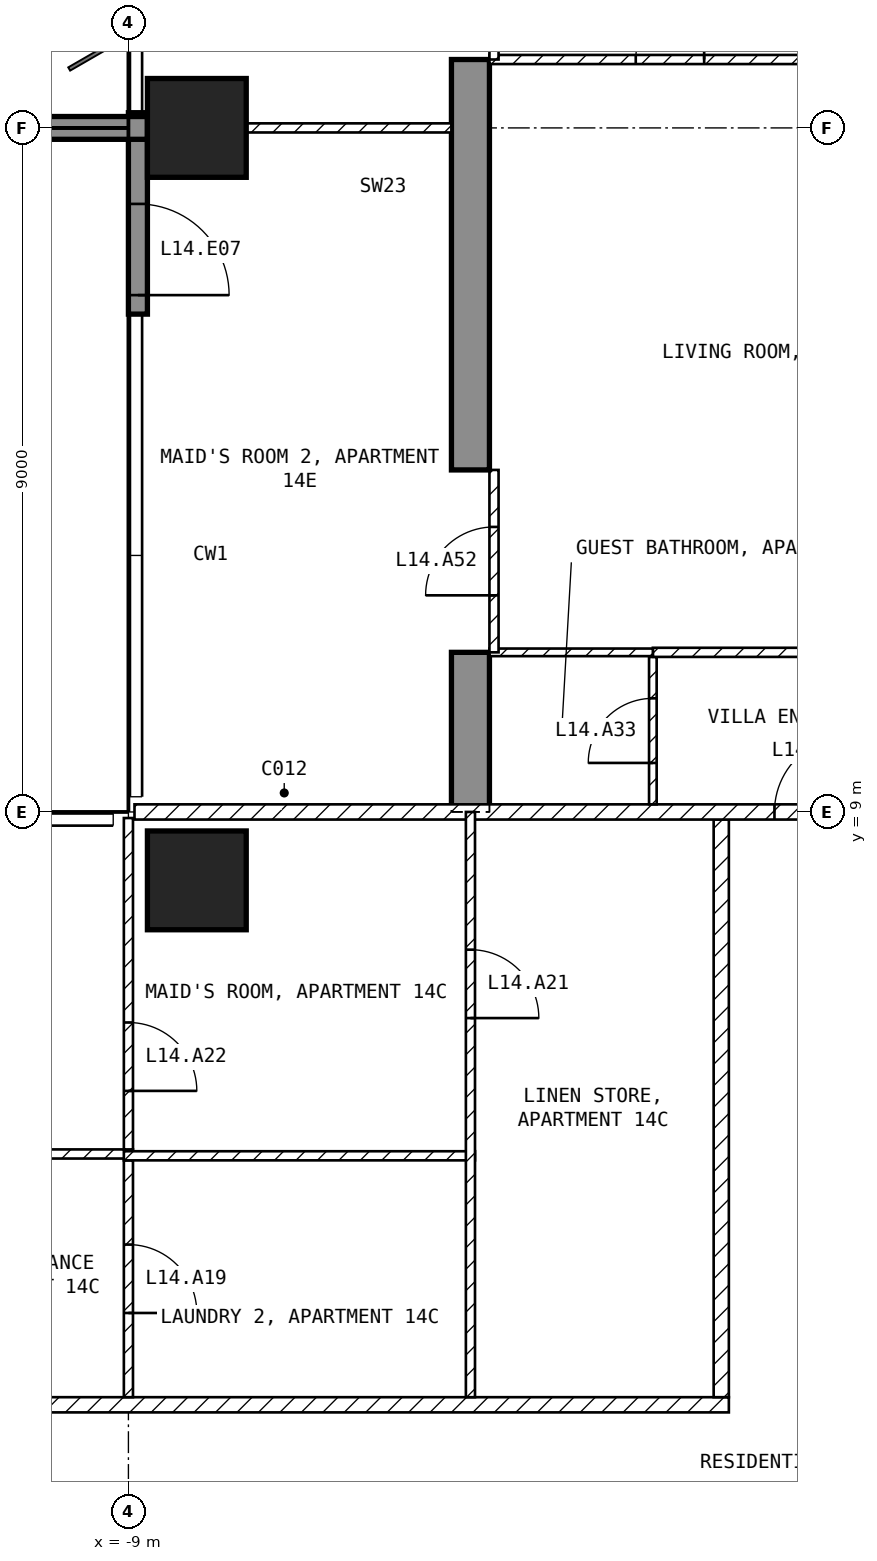
"""IFC4 building model, lengths in metres.
Left out: names, types, materials, properties, quantities, classifications, styles, units other than length and angle.
Written with IfcOpenShell. Run it as: python <this file> out.ifc"""

import sys

from ifc_helpers import new_model, si_unit, direction, frame, frame_2d, origin, origin_2d, place, context, subcontext, project, spatial, polyline, rectangle, outline, extrude, element, fill, save


model = new_model("IFC4")
c1 = context("Model", 3, precision=1e-05, world=origin(), true_north=direction((0.0, 1.0)))
c2 = subcontext(c1, "Body", "Model", "MODEL_VIEW")
j1 = project(units=[si_unit("LENGTHUNIT", "METRE"), si_unit("PLANEANGLEUNIT", "RADIAN")], contexts=[c1])
p1 = place(None, origin())
s1 = spatial("IfcSite", under=j1, at=p1, CompositionType="ELEMENT")
p2 = place(p1, origin())
s2 = spatial("IfcBuilding", under=s1, at=p2, CompositionType="ELEMENT")
p3 = place(p2, frame((0.0, 0.0, 68.0)))
s3 = spatial("IfcBuildingStorey", under=s2, at=p3, CompositionType="ELEMENT", Elevation=68.0)
for number, where, z_axis, x_axis in (
    (1, (-8.1, 8.1, -0.25), (0.0, 0.0, 1.0), (1.0, 0.0, 0.0)),
    (2, (-8.1, 18.0, -0.25), (0.0, 0.0, 1.0), (1.0, 0.0, 0.0)),
):
    element("IfcColumn", number, at=place(p3, frame(where, z_axis=z_axis, x_axis=x_axis)), inside=s3, PredefinedType="COLUMN", context=c2, shape_type="SweptSolid", body=[
        extrude(rectangle(XDim=1.3, YDim=1.3, at=origin_2d()), origin(), (0.0, 0.0, 1.0), 3.5),
    ])
p4 = place(p3, frame((-4.75, 9.0, -0.25), z_axis=(1.0, 0.0, 0.0), x_axis=(0.0, 1.0, 0.0)))
e3 = element("IfcWall", 3, at=p4, inside=s3, PredefinedType="SHEAR", context=c2, shape_type="SweptSolid", body=[
    extrude(outline(polyline([(0.0, 0.0), (2.1, 0.0), (2.1, 2.65), (4.5, 2.65), (4.5, 0.0), (9.9, 0.0), (9.9, 2.65), (12.3, 2.65), (12.3, 0.0), (16.45, 0.0), (16.45, 3.5), (0.0, 3.5), (0.0, 0.0)])), origin(), (0.0, 0.0, 1.0), 0.5),
])
p5 = place(p3, frame((-8.875, 18.2, 0.0), z_axis=(0.0, 0.0, 1.0), x_axis=(0.0, -1.0, 0.0)))
e4 = element("IfcWall", 4, at=p5, inside=s3, PredefinedType="SOLIDWALL", context=c2, shape_type="SweptSolid", body=[
    extrude(rectangle(XDim=2.65, YDim=0.25, at=frame_2d((1.325, 0.0))), origin(), (0.0, 0.0, 1.0), 3.25),
])
p6 = place(p5, frame((1.2, 0.0, 0.0)))
e5 = element("IfcOpeningElement", 5, at=p6, cuts=e4, PredefinedType="OPENING", context=c2, shape_type="SweptSolid", body=[
    extrude(rectangle(XDim=1.2, YDim=2.4, at=frame_2d((0.6, 1.2))), frame((0.0, 0.135, 0.0), z_axis=(0.0, -1.0, 0.0), x_axis=(1.0, 0.0, 0.0)), (0.0, 0.0, 1.0), 0.27),
])
p7 = place(p3, frame((-8.75, 18.0, 0.0), z_axis=(0.0, 0.0, 1.0), x_axis=(-1.0, 0.0, 0.0)))
e6 = element("IfcWall", 6, at=p7, inside=s3, PredefinedType="SOLIDWALL", context=c2, shape_type="SweptSolid", body=[
    extrude(rectangle(XDim=2.95, YDim=0.3, at=frame_2d((1.475, 0.0))), origin(), (0.0, 0.0, 1.0), 3.25),
])
p8 = place(p3, frame((-21.6, 1.2, 0.0), z_axis=(0.0, 0.0, 1.0), x_axis=(1.0, 0.0, 0.0)))
e7 = element("IfcWall", 7, at=p8, inside=s3, PredefinedType="PARTITIONING", context=c2, shape_type="SweptSolid", body=[
    extrude(rectangle(XDim=20.5, YDim=0.2, at=frame_2d((10.25, 0.0))), origin(), (0.0, 0.0, 1.0), 3.25),
])
p9 = place(p8, frame((10.3, 0.0, 0.0)))
e8 = element("IfcOpeningElement", 8, at=p9, cuts=e7, PredefinedType="OPENING", context=c2, shape_type="SweptSolid", body=[
    extrude(rectangle(XDim=1.0, YDim=2.1, at=frame_2d((0.5, 1.05))), frame((0.0, 0.11, 0.0), z_axis=(0.0, -1.0, 0.0), x_axis=(1.0, 0.0, 0.0)), (0.0, 0.0, 1.0), 0.22),
])
p10 = place(p3, frame((-1.2, 1.3, 0.0), z_axis=(0.0, 0.0, 1.0), x_axis=(0.0, 1.0, 0.0)))
e9 = element("IfcWall", 9, at=p10, inside=s3, PredefinedType="PARTITIONING", context=c2, shape_type="SweptSolid", body=[
    extrude(rectangle(XDim=7.6, YDim=0.2, at=frame_2d((3.8, 0.0))), origin(), (0.0, 0.0, 1.0), 3.25),
])
p11 = place(p3, frame((-8.92, 9.0, 0.0), z_axis=(0.0, 0.0, 1.0), x_axis=(1.0, 0.0, 0.0)))
e10 = element("IfcWall", 10, at=p11, inside=s3, PredefinedType="PARTITIONING", context=c2, shape_type="SweptSolid", body=[
    extrude(rectangle(XDim=17.84, YDim=0.2, at=frame_2d((8.92, 0.0))), origin(), (0.0, 0.0, 1.0), 3.25),
])
p12 = place(p11, frame((8.42, 0.0, 0.0)))
e11 = element("IfcOpeningElement", 11, at=p12, cuts=e10, PredefinedType="OPENING", context=c2, shape_type="SweptSolid", body=[
    extrude(rectangle(XDim=1.0, YDim=2.1, at=frame_2d((0.5, 1.05))), frame((0.0, 0.11, 0.0), z_axis=(0.0, -1.0, 0.0), x_axis=(1.0, 0.0, 0.0)), (0.0, 0.0, 1.0), 0.22),
])
p13 = place(p3, frame((-17.4, 4.5, 0.0), z_axis=(0.0, 0.0, 1.0), x_axis=(1.0, 0.0, 0.0)))
e12 = element("IfcWall", 12, at=p13, inside=s3, PredefinedType="PARTITIONING", context=c2, shape_type="SweptSolid", body=[
    extrude(rectangle(XDim=8.46, YDim=0.12, at=frame_2d((4.23, 0.0))), origin(), (0.0, 0.0, 1.0), 3.25),
])
p14 = place(p13, frame((0.45, 0.0, 0.0)))
e13 = element("IfcOpeningElement", 13, at=p14, cuts=e12, PredefinedType="OPENING", context=c2, shape_type="SweptSolid", body=[
    extrude(rectangle(XDim=0.9, YDim=2.1, at=frame_2d((0.45, 1.05))), frame((0.0, 0.07, 0.0), z_axis=(0.0, -1.0, 0.0), x_axis=(1.0, 0.0, 0.0)), (0.0, 0.0, 1.0), 0.14),
])
p15 = place(p13, frame((6.15, 0.0, 0.0)))
e14 = element("IfcOpeningElement", 14, at=p15, cuts=e12, PredefinedType="OPENING", context=c2, shape_type="SweptSolid", body=[
    extrude(rectangle(XDim=0.9, YDim=2.1, at=frame_2d((0.45, 1.05))), frame((0.0, 0.07, 0.0), z_axis=(0.0, -1.0, 0.0), x_axis=(1.0, 0.0, 0.0)), (0.0, 0.0, 1.0), 0.14),
])
p16 = place(p3, frame((-9.0, 4.416, 0.0), z_axis=(0.0, 0.0, 1.0), x_axis=(0.0, -1.0, 0.0)))
e15 = element("IfcWall", 15, at=p16, inside=s3, PredefinedType="PARTITIONING", context=c2, shape_type="SweptSolid", body=[
    extrude(rectangle(XDim=3.116, YDim=0.12, at=frame_2d((1.558, 0.0))), origin(), (0.0, 0.0, 1.0), 3.25),
])
p17 = place(p16, frame((1.108, 0.0, 0.0)))
e16 = element("IfcOpeningElement", 16, at=p17, cuts=e15, PredefinedType="OPENING", context=c2, shape_type="SweptSolid", body=[
    extrude(rectangle(XDim=0.9, YDim=2.1, at=frame_2d((0.45, 1.05))), frame((0.0, 0.07, 0.0), z_axis=(0.0, -1.0, 0.0), x_axis=(1.0, 0.0, 0.0)), (0.0, 0.0, 1.0), 0.14),
])
p18 = place(p3, frame((-9.0, 8.92, 0.0), z_axis=(0.0, 0.0, 1.0), x_axis=(0.0, -1.0, 0.0)))
e17 = element("IfcWall", 17, at=p18, inside=s3, PredefinedType="PARTITIONING", context=c2, shape_type="SweptSolid", body=[
    extrude(rectangle(XDim=4.36, YDim=0.12, at=frame_2d((2.18, 0.0))), origin(), (0.0, 0.0, 1.0), 3.25),
])
p19 = place(p18, frame((2.69, 0.0, 0.0)))
e18 = element("IfcOpeningElement", 18, at=p19, cuts=e17, PredefinedType="OPENING", context=c2, shape_type="SweptSolid", body=[
    extrude(rectangle(XDim=0.9, YDim=2.1, at=frame_2d((0.45, 1.05))), frame((0.0, 0.07, 0.0), z_axis=(0.0, -1.0, 0.0), x_axis=(1.0, 0.0, 0.0)), (0.0, 0.0, 1.0), 0.14),
])
p20 = place(p3, frame((-9.06, 4.476, 0.0), z_axis=(0.0, 0.0, 1.0), x_axis=(1.0, 0.0, 0.0)))
e19 = element("IfcWall", 19, at=p20, inside=s3, PredefinedType="PARTITIONING", context=c2, shape_type="SweptSolid", body=[
    extrude(rectangle(XDim=4.62, YDim=0.12, at=frame_2d((2.31, 0.0))), origin(), (0.0, 0.0, 1.0), 3.25),
])
p21 = place(p3, frame((-4.5, 9.0, 0.0), z_axis=(0.0, 0.0, 1.0), x_axis=(0.0, -1.0, 0.0)))
e20 = element("IfcWall", 20, at=p21, inside=s3, PredefinedType="PARTITIONING", context=c2, shape_type="SweptSolid", body=[
    extrude(rectangle(XDim=7.7, YDim=0.12, at=frame_2d((3.85, 0.0))), origin(), (0.0, 0.0, 1.0), 3.25),
])
p22 = place(p21, frame((1.812, 0.0, 0.0)))
e21 = element("IfcOpeningElement", 21, at=p22, cuts=e20, PredefinedType="OPENING", context=c2, shape_type="SweptSolid", body=[
    extrude(rectangle(XDim=0.9, YDim=2.1, at=frame_2d((0.45, 1.05))), frame((0.0, 0.07, 0.0), z_axis=(0.0, -1.0, 0.0), x_axis=(1.0, 0.0, 0.0)), (0.0, 0.0, 1.0), 0.14),
])
p23 = place(p3, frame((-2.1, 9.1, 0.0), z_axis=(0.0, 0.0, 1.0), x_axis=(0.0, 1.0, 0.0)))
e22 = element("IfcWall", 22, at=p23, inside=s3, PredefinedType="PARTITIONING", context=c2, shape_type="SweptSolid", body=[
    extrude(rectangle(XDim=1.94, YDim=0.1, at=frame_2d((0.97, 0.0))), origin(), (0.0, 0.0, 1.0), 3.25),
])
p24 = place(p23, frame((0.545, 0.0, 0.0)))
e23 = element("IfcOpeningElement", 23, at=p24, cuts=e22, PredefinedType="OPENING", context=c2, shape_type="SweptSolid", body=[
    extrude(rectangle(XDim=0.85, YDim=2.1, at=frame_2d((0.425, 1.05))), frame((0.0, 0.06, 0.0), z_axis=(0.0, -1.0, 0.0), x_axis=(1.0, 0.0, 0.0)), (0.0, 0.0, 1.0), 0.12),
])
p25 = place(p3, frame((-2.1, 11.1, 0.0), z_axis=(0.0, 0.0, 1.0), x_axis=(1.0, 0.0, 0.0)))
e24 = element("IfcWall", 24, at=p25, inside=s3, PredefinedType="PARTITIONING", context=c2, shape_type="SweptSolid", body=[
    extrude(rectangle(XDim=6.35, YDim=0.12, at=frame_2d((3.175, 0.0))), origin(), (0.0, 0.0, 1.0), 3.25),
])
p26 = place(p25, frame((2.725, 0.0, 0.0)))
e25 = element("IfcOpeningElement", 25, at=p26, cuts=e24, PredefinedType="OPENING", context=c2, shape_type="SweptSolid", body=[
    extrude(rectangle(XDim=0.9, YDim=2.1, at=frame_2d((0.45, 1.05))), frame((0.0, 0.07, 0.0), z_axis=(0.0, -1.0, 0.0), x_axis=(1.0, 0.0, 0.0)), (0.0, 0.0, 1.0), 0.14),
])
p27 = place(p3, frame((-4.25, 11.1, 0.0), z_axis=(0.0, 0.0, 1.0), x_axis=(1.0, 0.0, 0.0)))
e26 = element("IfcWall", 26, at=p27, inside=s3, PredefinedType="PARTITIONING", context=c2, shape_type="SweptSolid", body=[
    extrude(rectangle(XDim=2.15, YDim=0.1, at=frame_2d((1.075, 0.0))), origin(), (0.0, 0.0, 1.0), 3.25),
])
p28 = place(p3, frame((-4.25, 18.9, 0.0), z_axis=(0.0, 0.0, 1.0), x_axis=(1.0, 0.0, 0.0)))
e27 = element("IfcWall", 27, at=p28, inside=s3, PredefinedType="PARTITIONING", context=c2, shape_type="SweptSolid", body=[
    extrude(rectangle(XDim=8.5, YDim=0.12, at=frame_2d((4.25, 0.0))), origin(), (0.0, 0.0, 1.0), 3.25),
])
p29 = place(p28, frame((1.925, 0.0, 0.0)))
e28 = element("IfcOpeningElement", 28, at=p29, cuts=e27, PredefinedType="OPENING", context=c2, shape_type="SweptSolid", body=[
    extrude(rectangle(XDim=0.9, YDim=2.1, at=frame_2d((0.45, 1.05))), frame((0.0, 0.07, 0.0), z_axis=(0.0, -1.0, 0.0), x_axis=(1.0, 0.0, 0.0)), (0.0, 0.0, 1.0), 0.14),
])
p30 = place(p3, frame((-7.45, 18.0, 0.0), z_axis=(0.0, 0.0, 1.0), x_axis=(1.0, 0.0, 0.0)))
e29 = element("IfcWall", 29, at=p30, inside=s3, PredefinedType="PARTITIONING", context=c2, shape_type="SweptSolid", body=[
    extrude(rectangle(XDim=2.7, YDim=0.12, at=frame_2d((1.35, 0.0))), origin(), (0.0, 0.0, 1.0), 2.346),
])
p31 = place(p3, frame((-4.19, 11.1, 0.0), z_axis=(0.0, 0.0, 1.0), x_axis=(0.0, 1.0, 0.0)))
e30 = element("IfcWall", 30, at=p31, inside=s3, PredefinedType="PARTITIONING", context=c2, shape_type="SweptSolid", body=[
    extrude(rectangle(XDim=2.4, YDim=0.12, at=frame_2d((1.2, 0.0))), origin(), (0.0, 0.0, 1.0), 2.4),
])
p32 = place(p31, frame((0.75, 0.0, 0.0)))
e31 = element("IfcOpeningElement", 31, at=p32, cuts=e30, PredefinedType="OPENING", context=c2, shape_type="SweptSolid", body=[
    extrude(rectangle(XDim=0.9, YDim=2.1, at=frame_2d((0.45, 1.05))), frame((0.0, 0.07, 0.0), z_axis=(0.0, -1.0, 0.0), x_axis=(1.0, 0.0, 0.0)), (0.0, 0.0, 1.0), 0.14),
])
p33 = place(p3, frame((-4.19, 18.9, 0.0), z_axis=(0.0, 0.0, 1.0), x_axis=(0.0, 1.0, 0.0)))
e32 = element("IfcWall", 32, at=p33, inside=s3, PredefinedType="PARTITIONING", context=c2, shape_type="SweptSolid", body=[
    extrude(rectangle(XDim=2.4, YDim=0.12, at=frame_2d((1.2, 0.0))), origin(), (0.0, 0.0, 1.0), 2.4),
])
p34 = place(p33, frame((0.75, 0.0, 0.0)))
e33 = element("IfcOpeningElement", 33, at=p34, cuts=e32, PredefinedType="OPENING", context=c2, shape_type="SweptSolid", body=[
    extrude(rectangle(XDim=0.9, YDim=2.1, at=frame_2d((0.45, 1.05))), frame((0.0, 0.07, 0.0), z_axis=(0.0, -1.0, 0.0), x_axis=(1.0, 0.0, 0.0)), (0.0, 0.0, 1.0), 0.14),
])
p35 = place(p6, origin())
e34 = element("IfcDoor", 34, at=p35, inside=s3, OperationType="SINGLE_SWING_RIGHT", PredefinedType="DOOR", context=c2, shape_type="SweptSolid", body=[
    extrude(rectangle(XDim=1.2, YDim=2.4, at=frame_2d((0.6, 1.2))), frame((0.0, 0.025, 0.0), z_axis=(0.0, -1.0, 0.0), x_axis=(1.0, 0.0, 0.0)), (0.0, 0.0, 1.0), 0.05),
])
fill(e5, e34)
p36 = place(p17, origin())
e35 = element("IfcDoor", 35, at=p36, inside=s3, OperationType="SINGLE_SWING_RIGHT", PredefinedType="DOOR", context=c2, shape_type="SweptSolid", body=[
    extrude(rectangle(XDim=0.9, YDim=2.1, at=frame_2d((0.45, 1.05))), frame((0.0, 0.025, 0.0), z_axis=(0.0, -1.0, 0.0), x_axis=(1.0, 0.0, 0.0)), (0.0, 0.0, 1.0), 0.05),
])
fill(e16, e35)
p37 = place(p22, origin())
e36 = element("IfcDoor", 36, at=p37, inside=s3, OperationType="SINGLE_SWING_RIGHT", PredefinedType="DOOR", context=c2, shape_type="SweptSolid", body=[
    extrude(rectangle(XDim=0.9, YDim=2.1, at=frame_2d((0.45, 1.05))), frame((0.0, 0.025, 0.0), z_axis=(0.0, -1.0, 0.0), x_axis=(1.0, 0.0, 0.0)), (0.0, 0.0, 1.0), 0.05),
])
fill(e21, e36)
p38 = place(p19, origin())
e37 = element("IfcDoor", 37, at=p38, inside=s3, OperationType="SINGLE_SWING_RIGHT", PredefinedType="DOOR", context=c2, shape_type="SweptSolid", body=[
    extrude(rectangle(XDim=0.9, YDim=2.1, at=frame_2d((0.45, 1.05))), frame((0.0, 0.025, 0.0), z_axis=(0.0, -1.0, 0.0), x_axis=(1.0, 0.0, 0.0)), (0.0, 0.0, 1.0), 0.05),
])
fill(e18, e37)
p39 = place(p12, origin())
e38 = element("IfcDoor", 38, at=p39, inside=s3, OperationType="SINGLE_SWING_RIGHT", PredefinedType="DOOR", context=c2, shape_type="SweptSolid", body=[
    extrude(rectangle(XDim=1.0, YDim=2.1, at=frame_2d((0.5, 1.05))), frame((0.0, 0.025, 0.0), z_axis=(0.0, -1.0, 0.0), x_axis=(1.0, 0.0, 0.0)), (0.0, 0.0, 1.0), 0.05),
])
fill(e11, e38)
p40 = place(p24, origin())
e39 = element("IfcDoor", 39, at=p40, inside=s3, OperationType="SINGLE_SWING_LEFT", PredefinedType="DOOR", context=c2, shape_type="SweptSolid", body=[
    extrude(rectangle(XDim=0.85, YDim=2.1, at=frame_2d((0.425, 1.05))), frame((0.0, 0.025, 0.0), z_axis=(0.0, -1.0, 0.0), x_axis=(1.0, 0.0, 0.0)), (0.0, 0.0, 1.0), 0.05),
])
fill(e23, e39)
p41 = place(p29, origin())
e40 = element("IfcDoor", 40, at=p41, inside=s3, OperationType="SINGLE_SWING_RIGHT", PredefinedType="DOOR", context=c2, shape_type="SweptSolid", body=[
    extrude(rectangle(XDim=0.9, YDim=2.1, at=frame_2d((0.45, 1.05))), frame((0.0, 0.025, 0.0), z_axis=(0.0, -1.0, 0.0), x_axis=(1.0, 0.0, 0.0)), (0.0, 0.0, 1.0), 0.05),
])
fill(e28, e40)
p42 = place(p32, origin())
e41 = element("IfcDoor", 41, at=p42, inside=s3, OperationType="SINGLE_SWING_LEFT", PredefinedType="DOOR", context=c2, shape_type="SweptSolid", body=[
    extrude(rectangle(XDim=0.9, YDim=2.1, at=frame_2d((0.45, 1.05))), frame((0.0, 0.025, 0.0), z_axis=(0.0, -1.0, 0.0), x_axis=(1.0, 0.0, 0.0)), (0.0, 0.0, 1.0), 0.05),
])
fill(e31, e41)
save(model, sys.argv[1])
